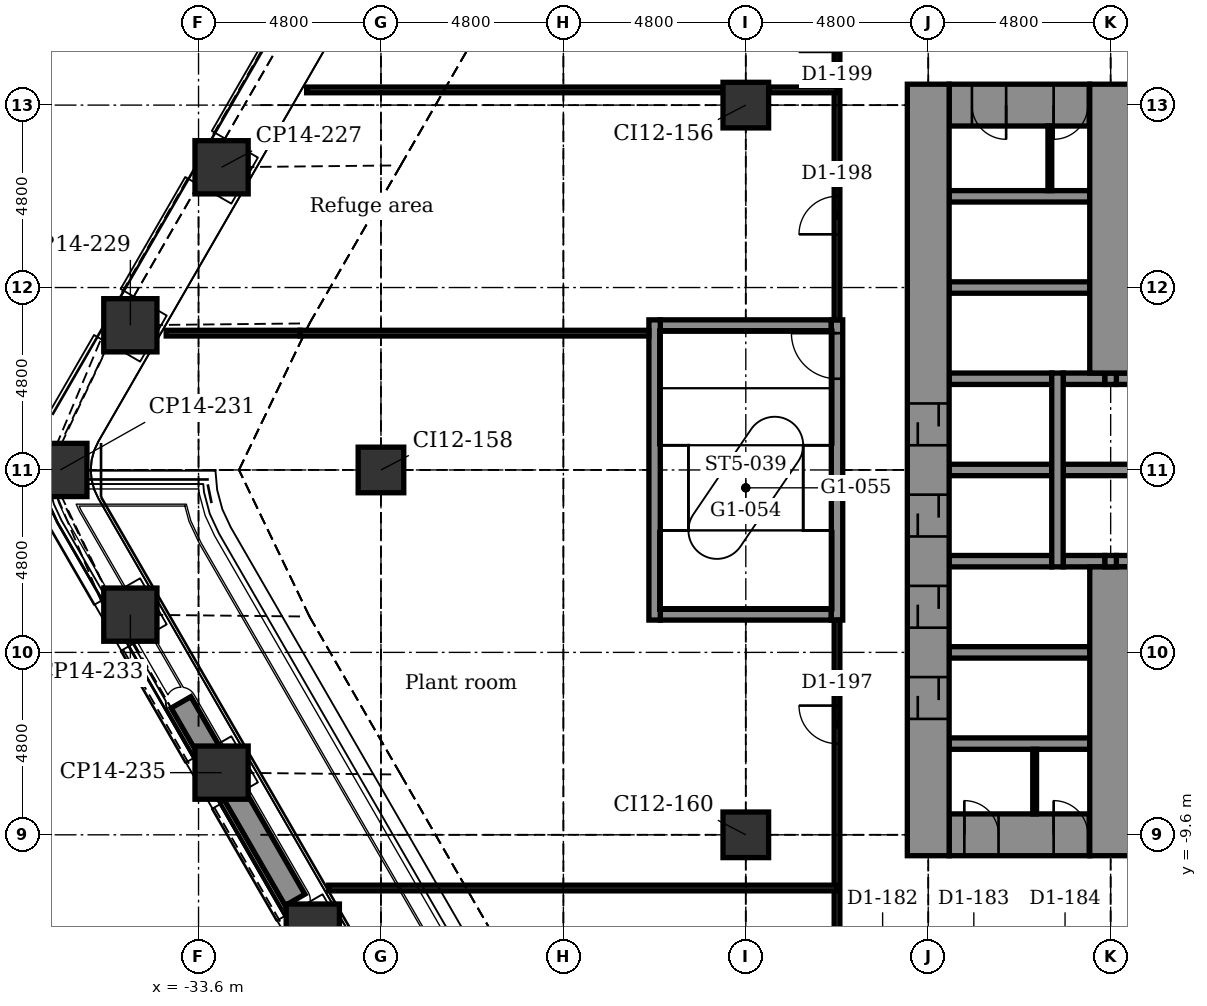
"""IFC4 building model, lengths in metres.
Left out: names, types, materials, properties, quantities, classifications, styles, units other than length and angle.
Written with IfcOpenShell. Run it as: python <this file> out.ifc"""

import sys

from ifc_helpers import new_model, si_unit, direction, frame, frame_2d, origin, origin_2d, place, context, subcontext, project, spatial, rectangle, extrude, element, fill, save


model = new_model("IFC4")
c1 = context("Model", 3, precision=1e-05, world=origin(), true_north=direction((0.0, 1.0)))
c2 = subcontext(c1, "Body", "Model", "MODEL_VIEW")
j1 = project(units=[si_unit("LENGTHUNIT", "METRE"), si_unit("PLANEANGLEUNIT", "RADIAN")], contexts=[c1])
p1 = place(None, origin())
s1 = spatial("IfcSite", under=j1, at=p1, CompositionType="ELEMENT")
p2 = place(p1, origin())
s2 = spatial("IfcBuilding", under=s1, at=p2, CompositionType="ELEMENT")
p3 = place(p2, frame((0.0, 0.0, 71.9)))
s3 = spatial("IfcBuildingStorey", under=s2, at=p3, CompositionType="ELEMENT", Elevation=71.9)
for number, where, z_axis, x_axis in (
    (1, (-30.594, -12.121, -0.3), (0.0, 0.0, 1.0), (0.866, 0.5, 0.0)),
    (2, (-32.994, -7.964, -0.3), (0.0, 0.0, 1.0), (0.866, 0.5, 0.0)),
    (3, (-35.394, -3.807, -0.3), (0.0, 0.0, 1.0), (0.866, 0.5, 0.0)),
    (4, (-37.236, 0.0, -0.3), (0.0, 0.0, 1.0), (1.0, 0.0, 0.0)),
    (5, (-35.394, 3.807, -0.3), (0.0, 0.0, 1.0), (0.5, 0.866, 0.0)),
    (6, (-32.994, 7.964, -0.3), (0.0, 0.0, 1.0), (0.5, 0.866, 0.0)),
):
    element("IfcColumn", number, at=place(p3, frame(where, z_axis=z_axis, x_axis=x_axis)), inside=s3, PredefinedType="COLUMN", context=c2, shape_type="SweptSolid", body=[
        extrude(rectangle(XDim=1.4, YDim=1.4, at=origin_2d()), origin(), (0.0, 0.0, 1.0), 6.1),
    ])
for number, where, z_axis, x_axis in (
    (7, (-28.8, 0.0, -0.3), (0.0, 0.0, 1.0), (1.0, 0.0, 0.0)),
    (8, (-19.2, -9.6, -0.3), (0.0, 0.0, 1.0), (1.0, 0.0, 0.0)),
    (9, (-19.2, 9.6, -0.3), (0.0, 0.0, 1.0), (1.0, 0.0, 0.0)),
):
    element("IfcColumn", number, at=place(p3, frame(where, z_axis=z_axis, x_axis=x_axis)), inside=s3, PredefinedType="COLUMN", context=c2, shape_type="SweptSolid", body=[
        extrude(rectangle(XDim=1.2, YDim=1.2, at=origin_2d()), origin(), (0.0, 0.0, 1.0), 6.1),
    ])
p4 = place(p3, frame((-13.85, -9.6, -0.3), z_axis=(0.0, 0.0, 1.0), x_axis=(1.0, 0.0, 0.0)))
e10 = element("IfcWall", 10, at=p4, inside=s3, PredefinedType="SHEAR", context=c2, shape_type="SweptSolid", body=[
    extrude(rectangle(XDim=3.7, YDim=1.1, at=frame_2d((1.85, 0.0))), origin(), (0.0, 0.0, 1.0), 6.1),
])
p5 = place(p4, frame((0.4, 0.0, 0.3)))
e11 = element("IfcOpeningElement", 11, at=p5, cuts=e10, PredefinedType="OPENING", context=c2, shape_type="SweptSolid", body=[
    extrude(rectangle(XDim=0.9, YDim=2.1, at=frame_2d((0.45, 1.05))), frame((0.0, 0.56, 0.0), z_axis=(0.0, -1.0, 0.0), x_axis=(1.0, 0.0, 0.0)), (0.0, 0.0, 1.0), 1.12),
])
p6 = place(p4, frame((2.75, 0.0, 0.3)))
e12 = element("IfcOpeningElement", 12, at=p6, cuts=e10, PredefinedType="OPENING", context=c2, shape_type="SweptSolid", body=[
    extrude(rectangle(XDim=0.9, YDim=2.1, at=frame_2d((0.45, 1.05))), frame((0.0, 0.56, 0.0), z_axis=(0.0, -1.0, 0.0), x_axis=(1.0, 0.0, 0.0)), (0.0, 0.0, 1.0), 1.12),
])
for number, where, z_axis, x_axis in (
    (13, (-13.85, -7.2, -0.3), (0.0, 0.0, 1.0), (1.0, 0.0, 0.0)),
    (14, (-13.85, -4.8, -0.3), (0.0, 0.0, 1.0), (1.0, 0.0, 0.0)),
):
    element("IfcWall", number, at=place(p3, frame(where, z_axis=z_axis, x_axis=x_axis)), inside=s3, PredefinedType="STANDARD", context=c2, shape_type="SweptSolid", body=[
        extrude(rectangle(XDim=3.7, YDim=0.3, at=frame_2d((1.85, 0.0))), origin(), (0.0, 0.0, 1.0), 6.1),
    ])
p7 = place(p3, frame((-21.45, -3.8, -0.3), z_axis=(0.0, 0.0, 1.0), x_axis=(1.0, 0.0, 0.0)))
e15 = element("IfcWall", 15, at=p7, inside=s3, PredefinedType="STANDARD", context=c2, shape_type="SweptSolid", body=[
    extrude(rectangle(XDim=4.5, YDim=0.3, at=frame_2d((2.25, 0.0))), origin(), (0.0, 0.0, 1.0), 6.1),
])
p8 = place(p3, frame((-13.85, -2.4, -0.3), z_axis=(0.0, 0.0, 1.0), x_axis=(1.0, 0.0, 0.0)))
e16 = element("IfcWall", 16, at=p8, inside=s3, PredefinedType="STANDARD", context=c2, shape_type="SweptSolid", body=[
    extrude(rectangle(XDim=2.7, YDim=0.3, at=frame_2d((1.35, 0.0))), origin(), (0.0, 0.0, 1.0), 6.1),
])
p9 = place(p3, frame((-10.85, -2.4, -0.3), z_axis=(0.0, 0.0, 1.0), x_axis=(1.0, 0.0, 0.0)))
e17 = element("IfcWall", 17, at=p9, inside=s3, PredefinedType="STANDARD", context=c2, shape_type="SweptSolid", body=[
    extrude(rectangle(XDim=1.1, YDim=0.3, at=frame_2d((0.55, 0.0))), origin(), (0.0, 0.0, 1.0), 6.1),
])
p10 = place(p3, frame((-9.45, -2.4, -0.3), z_axis=(0.0, 0.0, 1.0), x_axis=(1.0, 0.0, 0.0)))
e18 = element("IfcWall", 18, at=p10, inside=s3, PredefinedType="STANDARD", context=c2, shape_type="SweptSolid", body=[
    extrude(rectangle(XDim=1.9, YDim=0.3, at=frame_2d((0.95, 0.0))), origin(), (0.0, 0.0, 1.0), 6.1),
])
p11 = place(p3, frame((-13.85, 0.0, -0.3), z_axis=(0.0, 0.0, 1.0), x_axis=(1.0, 0.0, 0.0)))
e19 = element("IfcWall", 19, at=p11, inside=s3, PredefinedType="STANDARD", context=c2, shape_type="SweptSolid", body=[
    extrude(rectangle(XDim=2.7, YDim=0.3, at=frame_2d((1.35, 0.0))), origin(), (0.0, 0.0, 1.0), 6.1),
])
p12 = place(p3, frame((-10.85, 0.0, -0.3), z_axis=(0.0, 0.0, 1.0), x_axis=(1.0, 0.0, 0.0)))
e20 = element("IfcWall", 20, at=p12, inside=s3, PredefinedType="STANDARD", context=c2, shape_type="SweptSolid", body=[
    extrude(rectangle(XDim=3.3, YDim=0.3, at=frame_2d((1.65, 0.0))), origin(), (0.0, 0.0, 1.0), 6.1),
])
p13 = place(p3, frame((-13.85, 2.4, -0.3), z_axis=(0.0, 0.0, 1.0), x_axis=(1.0, 0.0, 0.0)))
e21 = element("IfcWall", 21, at=p13, inside=s3, PredefinedType="STANDARD", context=c2, shape_type="SweptSolid", body=[
    extrude(rectangle(XDim=2.7, YDim=0.3, at=frame_2d((1.35, 0.0))), origin(), (0.0, 0.0, 1.0), 6.1),
])
p14 = place(p3, frame((-10.85, 2.4, -0.3), z_axis=(0.0, 0.0, 1.0), x_axis=(1.0, 0.0, 0.0)))
e22 = element("IfcWall", 22, at=p14, inside=s3, PredefinedType="STANDARD", context=c2, shape_type="SweptSolid", body=[
    extrude(rectangle(XDim=1.1, YDim=0.3, at=frame_2d((0.55, 0.0))), origin(), (0.0, 0.0, 1.0), 6.1),
])
p15 = place(p3, frame((-9.45, 2.4, -0.3), z_axis=(0.0, 0.0, 1.0), x_axis=(1.0, 0.0, 0.0)))
e23 = element("IfcWall", 23, at=p15, inside=s3, PredefinedType="STANDARD", context=c2, shape_type="SweptSolid", body=[
    extrude(rectangle(XDim=1.9, YDim=0.3, at=frame_2d((0.95, 0.0))), origin(), (0.0, 0.0, 1.0), 6.1),
])
p16 = place(p3, frame((-21.45, 3.8, -0.3), z_axis=(0.0, 0.0, 1.0), x_axis=(1.0, 0.0, 0.0)))
e24 = element("IfcWall", 24, at=p16, inside=s3, PredefinedType="STANDARD", context=c2, shape_type="SweptSolid", body=[
    extrude(rectangle(XDim=4.5, YDim=0.3, at=frame_2d((2.25, 0.0))), origin(), (0.0, 0.0, 1.0), 6.1),
])
for number, where, z_axis, x_axis in (
    (25, (-13.85, 4.8, -0.3), (0.0, 0.0, 1.0), (1.0, 0.0, 0.0)),
    (26, (-13.85, 7.2, -0.3), (0.0, 0.0, 1.0), (1.0, 0.0, 0.0)),
):
    element("IfcWall", number, at=place(p3, frame(where, z_axis=z_axis, x_axis=x_axis)), inside=s3, PredefinedType="STANDARD", context=c2, shape_type="SweptSolid", body=[
        extrude(rectangle(XDim=3.7, YDim=0.3, at=frame_2d((1.85, 0.0))), origin(), (0.0, 0.0, 1.0), 6.1),
    ])
p17 = place(p3, frame((-13.85, 9.6, -0.3), z_axis=(0.0, 0.0, 1.0), x_axis=(1.0, 0.0, 0.0)))
e27 = element("IfcWall", 27, at=p17, inside=s3, PredefinedType="SHEAR", context=c2, shape_type="SweptSolid", body=[
    extrude(rectangle(XDim=3.7, YDim=1.1, at=frame_2d((1.85, 0.0))), origin(), (0.0, 0.0, 1.0), 6.1),
])
p18 = place(p17, frame((0.6, 0.0, 0.3)))
e28 = element("IfcOpeningElement", 28, at=p18, cuts=e27, PredefinedType="OPENING", context=c2, shape_type="SweptSolid", body=[
    extrude(rectangle(XDim=0.9, YDim=2.1, at=frame_2d((0.45, 1.05))), frame((0.0, 0.56, 0.0), z_axis=(0.0, -1.0, 0.0), x_axis=(1.0, 0.0, 0.0)), (0.0, 0.0, 1.0), 1.12),
])
p19 = place(p17, frame((2.75, 0.0, 0.3)))
e29 = element("IfcOpeningElement", 29, at=p19, cuts=e27, PredefinedType="OPENING", context=c2, shape_type="SweptSolid", body=[
    extrude(rectangle(XDim=0.9, YDim=2.1, at=frame_2d((0.45, 1.05))), frame((0.0, 0.56, 0.0), z_axis=(0.0, -1.0, 0.0), x_axis=(1.0, 0.0, 0.0)), (0.0, 0.0, 1.0), 1.12),
])
p20 = place(p3, frame((-21.6, -3.95, -0.3), z_axis=(0.0, 0.0, 1.0), x_axis=(0.0, 1.0, 0.0)))
e30 = element("IfcWall", 30, at=p20, inside=s3, PredefinedType="STANDARD", context=c2, shape_type="SweptSolid", body=[
    extrude(rectangle(XDim=7.9, YDim=0.3, at=frame_2d((3.95, 0.0))), origin(), (0.0, 0.0, 1.0), 6.1),
])
p21 = place(p3, frame((-16.8, -3.95, -0.3), z_axis=(0.0, 0.0, 1.0), x_axis=(0.0, 1.0, 0.0)))
e31 = element("IfcWall", 31, at=p21, inside=s3, PredefinedType="STANDARD", context=c2, shape_type="SweptSolid", body=[
    extrude(rectangle(XDim=7.9, YDim=0.3, at=frame_2d((3.95, 0.0))), origin(), (0.0, 0.0, 1.0), 6.1),
])
p22 = place(p21, frame((6.35, 0.0, 0.3)))
e32 = element("IfcOpeningElement", 32, at=p22, cuts=e31, PredefinedType="OPENING", context=c2, shape_type="SweptSolid", body=[
    extrude(rectangle(XDim=1.2, YDim=2.1, at=frame_2d((0.6, 1.05))), frame((0.0, 0.16, 0.0), z_axis=(0.0, -1.0, 0.0), x_axis=(1.0, 0.0, 0.0)), (0.0, 0.0, 1.0), 0.32),
])
p23 = place(p3, frame((-14.4, -10.15, -0.3), z_axis=(0.0, 0.0, 1.0), x_axis=(0.0, 1.0, 0.0)))
e33 = element("IfcWall", 33, at=p23, inside=s3, PredefinedType="SHEAR", context=c2, shape_type="SweptSolid", body=[
    extrude(rectangle(XDim=20.3, YDim=1.1, at=frame_2d((10.15, 0.0))), origin(), (0.0, 0.0, 1.0), 6.1),
])
p24 = place(p23, frame((3.6, 0.0, 0.3)))
e34 = element("IfcOpeningElement", 34, at=p24, cuts=e33, PredefinedType="OPENING", context=c2, shape_type="SweptSolid", body=[
    extrude(rectangle(XDim=1.1, YDim=2.1, at=frame_2d((0.55, 1.05))), frame((0.0, 0.56, 0.0), z_axis=(0.0, -1.0, 0.0), x_axis=(1.0, 0.0, 0.0)), (0.0, 0.0, 1.0), 1.12),
])
p25 = place(p23, frame((6.0, 0.0, 0.3)))
e35 = element("IfcOpeningElement", 35, at=p25, cuts=e33, PredefinedType="OPENING", context=c2, shape_type="SweptSolid", body=[
    extrude(rectangle(XDim=1.1, YDim=2.1, at=frame_2d((0.55, 1.05))), frame((0.0, 0.56, 0.0), z_axis=(0.0, -1.0, 0.0), x_axis=(1.0, 0.0, 0.0)), (0.0, 0.0, 1.0), 1.12),
])
p26 = place(p23, frame((8.4, 0.0, 0.3)))
e36 = element("IfcOpeningElement", 36, at=p26, cuts=e33, PredefinedType="OPENING", context=c2, shape_type="SweptSolid", body=[
    extrude(rectangle(XDim=1.1, YDim=2.1, at=frame_2d((0.55, 1.05))), frame((0.0, 0.56, 0.0), z_axis=(0.0, -1.0, 0.0), x_axis=(1.0, 0.0, 0.0)), (0.0, 0.0, 1.0), 1.12),
])
p27 = place(p23, frame((10.8, 0.0, 0.3)))
e37 = element("IfcOpeningElement", 37, at=p27, cuts=e33, PredefinedType="OPENING", context=c2, shape_type="SweptSolid", body=[
    extrude(rectangle(XDim=1.1, YDim=2.1, at=frame_2d((0.55, 1.05))), frame((0.0, 0.56, 0.0), z_axis=(0.0, -1.0, 0.0), x_axis=(1.0, 0.0, 0.0)), (0.0, 0.0, 1.0), 1.12),
])
p28 = place(p3, frame((-11.0, -2.55, -0.3), z_axis=(0.0, 0.0, 1.0), x_axis=(0.0, 1.0, 0.0)))
e38 = element("IfcWall", 38, at=p28, inside=s3, PredefinedType="STANDARD", context=c2, shape_type="SweptSolid", body=[
    extrude(rectangle(XDim=5.1, YDim=0.3, at=frame_2d((2.55, 0.0))), origin(), (0.0, 0.0, 1.0), 6.1),
])
p29 = place(p3, frame((-9.6, -10.15, -0.3), z_axis=(0.0, 0.0, 1.0), x_axis=(0.0, 1.0, 0.0)))
e39 = element("IfcWall", 39, at=p29, inside=s3, PredefinedType="SHEAR", context=c2, shape_type="SweptSolid", body=[
    extrude(rectangle(XDim=7.6, YDim=1.1, at=frame_2d((3.8, 0.0))), origin(), (0.0, 0.0, 1.0), 6.1),
])
for number, where, z_axis, x_axis in (
    (40, (-9.6, -2.55, -0.3), (0.0, 0.0, 1.0), (0.0, 1.0, 0.0)),
    (41, (-9.6, 2.25, -0.3), (0.0, 0.0, 1.0), (0.0, 1.0, 0.0)),
):
    element("IfcWall", number, at=place(p3, frame(where, z_axis=z_axis, x_axis=x_axis)), inside=s3, PredefinedType="STANDARD", context=c2, shape_type="SweptSolid", body=[
        extrude(rectangle(XDim=0.3, YDim=0.3, at=frame_2d((0.15, 0.0))), origin(), (0.0, 0.0, 1.0), 6.1),
    ])
p30 = place(p3, frame((-9.6, 2.55, -0.3), z_axis=(0.0, 0.0, 1.0), x_axis=(0.0, 1.0, 0.0)))
e42 = element("IfcWall", 42, at=p30, inside=s3, PredefinedType="SHEAR", context=c2, shape_type="SweptSolid", body=[
    extrude(rectangle(XDim=7.6, YDim=1.1, at=frame_2d((3.8, 0.0))), origin(), (0.0, 0.0, 1.0), 6.1),
])
p31 = place(p3, frame((-31.061, -11.312, 6.0), z_axis=(0.0, 0.0, 1.0), x_axis=(-0.499990139034, 0.866031096941, 0.0)))
e43 = element("IfcWall", 43, at=p31, inside=s3, PredefinedType="USERDEFINED", context=c2, shape_type="SweptSolid", body=[
    extrude(rectangle(XDim=6.0, YDim=0.6, at=frame_2d((3.0, 0.0))), origin(), (0.0, 0.0, 1.0), 0.7),
])
for number, where, z_axis, x_axis in (
    (44, (-11.2, 7.35, 0.0), (0.0, 0.0, 1.0), (0.0, 1.0, 0.0)),
    (45, (-11.6, -9.05, 0.0), (0.0, 0.0, 1.0), (0.0, 1.0, 0.0)),
):
    element("IfcWall", number, at=place(p3, frame(where, z_axis=z_axis, x_axis=x_axis)), inside=s3, PredefinedType="PARTITIONING", context=c2, shape_type="SweptSolid", body=[
        extrude(rectangle(XDim=1.7, YDim=0.1, at=frame_2d((0.85, 0.0))), origin(), (0.0, 0.0, 1.0), 5.8),
    ])
p32 = place(p3, frame((-16.8, -12.4, 0.0), z_axis=(0.0, 0.0, 1.0), x_axis=(0.0, 1.0, 0.0)))
e46 = element("IfcWall", 46, at=p32, inside=s3, PredefinedType="PARTITIONING", context=c2, shape_type="SweptSolid", body=[
    extrude(rectangle(XDim=8.45, YDim=0.15, at=frame_2d((4.225, 0.0))), origin(), (0.0, 0.0, 1.0), 5.8),
])
p33 = place(p32, frame((5.2, 0.0, 0.0)))
e47 = element("IfcOpeningElement", 47, at=p33, cuts=e46, PredefinedType="OPENING", context=c2, shape_type="SweptSolid", body=[
    extrude(rectangle(XDim=1.0, YDim=2.1, at=frame_2d((0.5, 1.05))), frame((0.0, 0.085, 0.0), z_axis=(0.0, -1.0, 0.0), x_axis=(1.0, 0.0, 0.0)), (0.0, 0.0, 1.0), 0.17),
])
p34 = place(p3, frame((-16.8, 3.95, 0.0), z_axis=(0.0, 0.0, 1.0), x_axis=(0.0, 1.0, 0.0)))
e48 = element("IfcWall", 48, at=p34, inside=s3, PredefinedType="PARTITIONING", context=c2, shape_type="SweptSolid", body=[
    extrude(rectangle(XDim=9.05, YDim=0.15, at=frame_2d((4.525, 0.0))), origin(), (0.0, 0.0, 1.0), 5.8),
])
p35 = place(p34, frame((2.25, 0.0, 0.0)))
e49 = element("IfcOpeningElement", 49, at=p35, cuts=e48, PredefinedType="OPENING", context=c2, shape_type="SweptSolid", body=[
    extrude(rectangle(XDim=1.0, YDim=2.1, at=frame_2d((0.5, 1.05))), frame((0.0, 0.085, 0.0), z_axis=(0.0, -1.0, 0.0), x_axis=(1.0, 0.0, 0.0)), (0.0, 0.0, 1.0), 0.17),
])
p36 = place(p34, frame((7.05, 0.0, 0.0)))
e50 = element("IfcOpeningElement", 50, at=p36, cuts=e48, PredefinedType="OPENING", context=c2, shape_type="SweptSolid", body=[
    extrude(rectangle(XDim=1.0, YDim=2.1, at=frame_2d((0.5, 1.05))), frame((0.0, 0.085, 0.0), z_axis=(0.0, -1.0, 0.0), x_axis=(1.0, 0.0, 0.0)), (0.0, 0.0, 1.0), 0.17),
])
p37 = place(p3, frame((-30.178, -11.0, 0.0), z_axis=(0.0, 0.0, 1.0), x_axis=(1.0, 0.0, 0.0)))
e51 = element("IfcWall", 51, at=p37, inside=s3, PredefinedType="PARTITIONING", context=c2, shape_type="SweptSolid", body=[
    extrude(rectangle(XDim=13.378, YDim=0.15, at=frame_2d((6.689, 0.0))), origin(), (0.0, 0.0, 1.0), 5.7),
])
p38 = place(p3, frame((-30.928, 3.6, 0.0), z_axis=(0.0, 0.0, 1.0), x_axis=(1.0, 0.0, 0.0)))
e52 = element("IfcWall", 52, at=p38, inside=s3, PredefinedType="PARTITIONING", context=c2, shape_type="SweptSolid", body=[
    extrude(rectangle(XDim=9.178, YDim=0.15, at=frame_2d((4.589, 0.0))), origin(), (0.0, 0.0, 1.0), 5.8),
])
p39 = place(p3, frame((-34.451, 3.6, 0.0), z_axis=(0.0, 0.0, 1.0), x_axis=(1.0, 0.0, 0.0)))
e53 = element("IfcWall", 53, at=p39, inside=s3, PredefinedType="PARTITIONING", context=c2, shape_type="SweptSolid", body=[
    extrude(rectangle(XDim=3.523, YDim=0.15, at=frame_2d((1.762, 0.0))), origin(), (0.0, 0.0, 1.0), 4.0),
])
p40 = place(p3, frame((-30.756, 10.0, 0.0), z_axis=(0.0, 0.0, 1.0), x_axis=(1.0, 0.0, 0.0)))
e54 = element("IfcWall", 54, at=p40, inside=s3, PredefinedType="PARTITIONING", context=c2, shape_type="SweptSolid", body=[
    extrude(rectangle(XDim=10.956, YDim=0.15, at=frame_2d((5.478, 0.0))), origin(), (0.0, 0.0, 1.0), 5.8),
])
p41 = place(p3, frame((-18.6, 10.0, 0.0), z_axis=(0.0, 0.0, 1.0), x_axis=(1.0, 0.0, 0.0)))
e55 = element("IfcWall", 55, at=p41, inside=s3, PredefinedType="PARTITIONING", context=c2, shape_type="SweptSolid", body=[
    extrude(rectangle(XDim=1.8, YDim=0.15, at=frame_2d((0.9, 0.0))), origin(), (0.0, 0.0, 1.0), 5.8),
])
p42 = place(p33, origin())
e56 = element("IfcDoor", 56, at=p42, inside=s3, OperationType="SINGLE_SWING_RIGHT", PredefinedType="DOOR", context=c2, shape_type="SweptSolid", body=[
    extrude(rectangle(XDim=1.0, YDim=2.1, at=frame_2d((0.5, 1.05))), frame((0.0, 0.025, 0.0), z_axis=(0.0, -1.0, 0.0), x_axis=(1.0, 0.0, 0.0)), (0.0, 0.0, 1.0), 0.05),
])
fill(e47, e56)
p43 = place(p35, origin())
e57 = element("IfcDoor", 57, at=p43, inside=s3, OperationType="SINGLE_SWING_LEFT", PredefinedType="DOOR", context=c2, shape_type="SweptSolid", body=[
    extrude(rectangle(XDim=1.0, YDim=2.1, at=frame_2d((0.5, 1.05))), frame((0.0, 0.025, 0.0), z_axis=(0.0, -1.0, 0.0), x_axis=(1.0, 0.0, 0.0)), (0.0, 0.0, 1.0), 0.05),
])
fill(e49, e57)
p44 = place(p24, origin())
e58 = element("IfcDoor", 58, at=p44, inside=s3, OperationType="DOUBLE_DOOR_SLIDING", PredefinedType="DOOR", context=c2, shape_type="SweptSolid", body=[
    extrude(rectangle(XDim=1.1, YDim=2.1, at=frame_2d((0.55, 1.05))), frame((0.0, 0.025, 0.0), z_axis=(0.0, -1.0, 0.0), x_axis=(1.0, 0.0, 0.0)), (0.0, 0.0, 1.0), 0.05),
])
fill(e34, e58)
p45 = place(p25, origin())
e59 = element("IfcDoor", 59, at=p45, inside=s3, OperationType="DOUBLE_DOOR_SLIDING", PredefinedType="DOOR", context=c2, shape_type="SweptSolid", body=[
    extrude(rectangle(XDim=1.1, YDim=2.1, at=frame_2d((0.55, 1.05))), frame((0.0, 0.025, 0.0), z_axis=(0.0, -1.0, 0.0), x_axis=(1.0, 0.0, 0.0)), (0.0, 0.0, 1.0), 0.05),
])
fill(e35, e59)
p46 = place(p26, origin())
e60 = element("IfcDoor", 60, at=p46, inside=s3, OperationType="DOUBLE_DOOR_SLIDING", PredefinedType="DOOR", context=c2, shape_type="SweptSolid", body=[
    extrude(rectangle(XDim=1.1, YDim=2.1, at=frame_2d((0.55, 1.05))), frame((0.0, 0.025, 0.0), z_axis=(0.0, -1.0, 0.0), x_axis=(1.0, 0.0, 0.0)), (0.0, 0.0, 1.0), 0.05),
])
fill(e36, e60)
p47 = place(p27, origin())
e61 = element("IfcDoor", 61, at=p47, inside=s3, OperationType="DOUBLE_DOOR_SLIDING", PredefinedType="DOOR", context=c2, shape_type="SweptSolid", body=[
    extrude(rectangle(XDim=1.1, YDim=2.1, at=frame_2d((0.55, 1.05))), frame((0.0, 0.025, 0.0), z_axis=(0.0, -1.0, 0.0), x_axis=(1.0, 0.0, 0.0)), (0.0, 0.0, 1.0), 0.05),
])
fill(e37, e61)
p48 = place(p22, origin())
e62 = element("IfcDoor", 62, at=p48, inside=s3, OperationType="SINGLE_SWING_RIGHT", PredefinedType="DOOR", context=c2, shape_type="SweptSolid", body=[
    extrude(rectangle(XDim=1.2, YDim=2.1, at=frame_2d((0.6, 1.05))), frame((0.0, 0.025, 0.0), z_axis=(0.0, -1.0, 0.0), x_axis=(1.0, 0.0, 0.0)), (0.0, 0.0, 1.0), 0.05),
])
fill(e32, e62)
p49 = place(p5, origin())
e63 = element("IfcDoor", 63, at=p49, inside=s3, OperationType="SINGLE_SWING_LEFT", PredefinedType="DOOR", context=c2, shape_type="SweptSolid", body=[
    extrude(rectangle(XDim=0.9, YDim=2.1, at=frame_2d((0.45, 1.05))), frame((0.0, 0.025, 0.0), z_axis=(0.0, -1.0, 0.0), x_axis=(1.0, 0.0, 0.0)), (0.0, 0.0, 1.0), 0.05),
])
fill(e11, e63)
p50 = place(p6, origin())
e64 = element("IfcDoor", 64, at=p50, inside=s3, OperationType="SINGLE_SWING_LEFT", PredefinedType="DOOR", context=c2, shape_type="SweptSolid", body=[
    extrude(rectangle(XDim=0.9, YDim=2.1, at=frame_2d((0.45, 1.05))), frame((0.0, 0.025, 0.0), z_axis=(0.0, -1.0, 0.0), x_axis=(1.0, 0.0, 0.0)), (0.0, 0.0, 1.0), 0.05),
])
fill(e12, e64)
p51 = place(p18, frame((0.9, 0.0, 0.0), z_axis=(0.0, 0.0, 1.0), x_axis=(-1.0, 0.0, 0.0)))
e65 = element("IfcDoor", 65, at=p51, inside=s3, OperationType="SINGLE_SWING_RIGHT", PredefinedType="DOOR", context=c2, shape_type="SweptSolid", body=[
    extrude(rectangle(XDim=0.9, YDim=2.1, at=frame_2d((0.45, 1.05))), frame((0.0, 0.025, 0.0), z_axis=(0.0, -1.0, 0.0), x_axis=(1.0, 0.0, 0.0)), (0.0, 0.0, 1.0), 0.05),
])
fill(e28, e65)
p52 = place(p19, frame((0.9, 0.0, 0.0), z_axis=(0.0, 0.0, 1.0), x_axis=(-1.0, 0.0, 0.0)))
e66 = element("IfcDoor", 66, at=p52, inside=s3, OperationType="SINGLE_SWING_LEFT", PredefinedType="DOOR", context=c2, shape_type="SweptSolid", body=[
    extrude(rectangle(XDim=0.9, YDim=2.1, at=frame_2d((0.45, 1.05))), frame((0.0, 0.025, 0.0), z_axis=(0.0, -1.0, 0.0), x_axis=(1.0, 0.0, 0.0)), (0.0, 0.0, 1.0), 0.05),
])
fill(e29, e66)
save(model, sys.argv[1])
